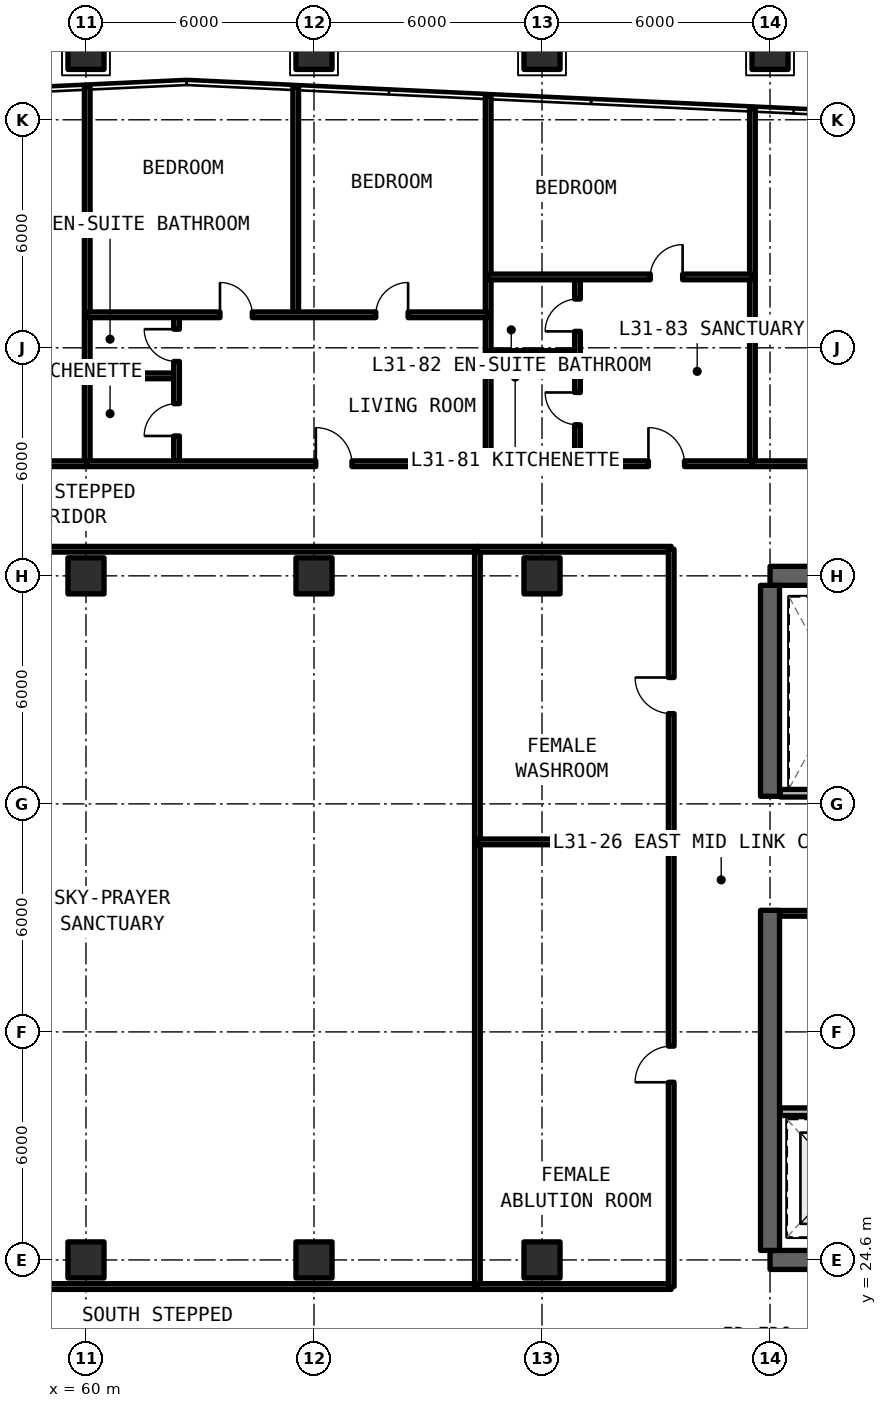
"""IFC4 building model, lengths in metres.
Left out: names, types, materials, properties, quantities, classifications, styles, units other than length and angle.
Written with IfcOpenShell. Run it as: python <this file> out.ifc"""

import sys

from ifc_helpers import new_model, si_unit, direction, frame, frame_2d, origin, origin_2d, place, context, subcontext, project, spatial, rectangle, extrude, element, fill, save


model = new_model("IFC4")
c1 = context("Model", 3, precision=1e-05, world=origin(), true_north=direction((0.0, 1.0)))
c2 = subcontext(c1, "Body", "Model", "MODEL_VIEW")
j1 = project(units=[si_unit("LENGTHUNIT", "METRE"), si_unit("PLANEANGLEUNIT", "RADIAN")], contexts=[c1])
p1 = place(None, origin())
s1 = spatial("IfcSite", under=j1, at=p1, CompositionType="ELEMENT")
p2 = place(p1, origin())
s2 = spatial("IfcBuilding", under=s1, at=p2, CompositionType="ELEMENT")
p3 = place(p2, frame((0.0, 0.0, 112.2)))
s3 = spatial("IfcBuildingStorey", under=s2, at=p3, CompositionType="ELEMENT", Elevation=112.2)
for number, where, z_axis, x_axis in (
    (1, (78.0, 24.6, 0.0), (0.0, 0.0, 1.0), (1.0, 0.0, 0.0)),
    (2, (90.0, 42.6, 0.0), (0.0, 0.0, 1.0), (-1.0, 0.0, 0.0)),
):
    element("IfcWall", number, at=place(p3, frame(where, z_axis=z_axis, x_axis=x_axis)), inside=s3, PredefinedType="SHEAR", context=c2, shape_type="SweptSolid", body=[
        extrude(rectangle(XDim=12.0, YDim=0.5, at=frame_2d((6.0, 0.0))), origin(), (0.0, 0.0, 1.0), 3.63),
    ])
p4 = place(p3, frame((78.0, 24.85, 0.0), z_axis=(0.0, 0.0, 1.0), x_axis=(0.0, 1.0, 0.0)))
e3 = element("IfcWall", 3, at=p4, inside=s3, PredefinedType="SHEAR", context=c2, shape_type="SweptSolid", body=[
    extrude(rectangle(XDim=8.95, YDim=0.5, at=frame_2d((4.475, 0.0))), origin(), (0.0, 0.0, 1.0), 3.63),
])
p5 = place(p3, frame((78.0, 36.8, 0.0), z_axis=(0.0, 0.0, 1.0), x_axis=(0.0, 1.0, 0.0)))
e4 = element("IfcWall", 4, at=p5, inside=s3, PredefinedType="SHEAR", context=c2, shape_type="SweptSolid", body=[
    extrude(rectangle(XDim=5.55, YDim=0.5, at=frame_2d((2.775, 0.0))), origin(), (0.0, 0.0, 1.0), 3.63),
])
for number, where, z_axis, x_axis in (
    (5, (60.0, 24.6, 0.0), (0.0, 0.0, 1.0), (1.0, 0.0, 0.0)),
    (6, (60.0, 42.6, 0.0), (0.0, 0.0, 1.0), (1.0, 0.0, 0.0)),
    (7, (66.0, 24.6, 0.0), (0.0, 0.0, 1.0), (1.0, 0.0, 0.0)),
    (8, (66.0, 42.6, 0.0), (0.0, 0.0, 1.0), (1.0, 0.0, 0.0)),
    (9, (72.0, 24.6, 0.0), (0.0, 0.0, 1.0), (1.0, 0.0, 0.0)),
    (10, (72.0, 42.6, 0.0), (0.0, 0.0, 1.0), (1.0, 0.0, 0.0)),
    (11, (60.0, 56.4, 0.0), (0.0, 0.0, 1.0), (1.0, 0.0, 0.0)),
    (12, (66.0, 56.4, 0.0), (0.0, 0.0, 1.0), (1.0, 0.0, 0.0)),
    (13, (72.0, 56.4, 0.0), (0.0, 0.0, 1.0), (1.0, 0.0, 0.0)),
    (14, (78.0, 56.4, 0.0), (0.0, 0.0, 1.0), (1.0, 0.0, 0.0)),
):
    element("IfcColumn", number, at=place(p3, frame(where, z_axis=z_axis, x_axis=x_axis)), inside=s3, PredefinedType="COLUMN", context=c2, shape_type="SweptSolid", body=[
        extrude(rectangle(XDim=0.95, YDim=0.95, at=origin_2d()), origin(), (0.0, 0.0, 1.0), 3.63),
    ])
p6 = place(p3, frame((78.27, 28.5, 0.0), z_axis=(0.0, 0.0, 1.0), x_axis=(1.0, 0.0, 0.0)))
e15 = element("IfcWall", 15, at=p6, inside=s3, PredefinedType="SOLIDWALL", context=c2, shape_type="SweptSolid", body=[
    extrude(rectangle(XDim=7.51, YDim=0.2, at=frame_2d((3.755, 0.0))), origin(), (0.0, 0.0, 1.0), 2.63),
])
p7 = place(p6, frame((3.53, 0.0, 0.0)))
e16 = element("IfcOpeningElement", 16, at=p7, cuts=e15, PredefinedType="OPENING", context=c2, shape_type="SweptSolid", body=[
    extrude(rectangle(XDim=1.0, YDim=2.15, at=frame_2d((0.5, 1.075))), frame((0.0, 0.11, 0.0), z_axis=(0.0, -1.0, 0.0), x_axis=(1.0, 0.0, 0.0)), (0.0, 0.0, 1.0), 0.22),
])
p8 = place(p3, frame((78.27, 33.72, 0.0), z_axis=(0.0, 0.0, 1.0), x_axis=(1.0, 0.0, 0.0)))
e17 = element("IfcWall", 17, at=p8, inside=s3, PredefinedType="SOLIDWALL", context=c2, shape_type="SweptSolid", body=[
    extrude(rectangle(XDim=3.05, YDim=0.15, at=frame_2d((1.525, 0.0))), origin(), (0.0, 0.0, 1.0), 2.63),
])
p9 = place(p3, frame((78.27, 36.88, 0.0), z_axis=(0.0, 0.0, 1.0), x_axis=(1.0, 0.0, 0.0)))
e18 = element("IfcWall", 18, at=p9, inside=s3, PredefinedType="SOLIDWALL", context=c2, shape_type="SweptSolid", body=[
    extrude(rectangle(XDim=3.05, YDim=0.2, at=frame_2d((1.525, 0.0))), origin(), (0.0, 0.0, 1.0), 2.63),
])
p10 = place(p3, frame((42.9, 23.9, 0.0), z_axis=(0.0, 0.0, 1.0), x_axis=(1.0, 0.0, 0.0)))
e19 = element("IfcWall", 19, at=p10, inside=s3, PredefinedType="SOLIDWALL", context=c2, shape_type="SweptSolid", body=[
    extrude(rectangle(XDim=27.4, YDim=0.15, at=frame_2d((13.7, 0.0))), origin(), (0.0, 0.0, 1.0), 2.63),
])
p11 = place(p10, frame((13.0, 0.0, 0.0)))
e20 = element("IfcOpeningElement", 20, at=p11, cuts=e19, PredefinedType="OPENING", context=c2, shape_type="SweptSolid", body=[
    extrude(rectangle(XDim=1.4, YDim=2.15, at=frame_2d((0.7, 1.075))), frame((0.0, 0.085, 0.0), z_axis=(0.0, -1.0, 0.0), x_axis=(1.0, 0.0, 0.0)), (0.0, 0.0, 1.0), 0.17),
])
p12 = place(p3, frame((42.9, 43.3, 0.0), z_axis=(0.0, 0.0, 1.0), x_axis=(1.0, 0.0, 0.0)))
e21 = element("IfcWall", 21, at=p12, inside=s3, PredefinedType="SOLIDWALL", context=c2, shape_type="SweptSolid", body=[
    extrude(rectangle(XDim=27.4, YDim=0.15, at=frame_2d((13.7, 0.0))), origin(), (0.0, 0.0, 1.0), 2.63),
])
p13 = place(p3, frame((70.3, 23.9, 0.0), z_axis=(0.0, 0.0, 1.0), x_axis=(0.0, 1.0, 0.0)))
e22 = element("IfcWall", 22, at=p13, inside=s3, PredefinedType="SOLIDWALL", context=c2, shape_type="SweptSolid", body=[
    extrude(rectangle(XDim=19.4, YDim=0.15, at=frame_2d((9.7, 0.0))), origin(), (0.0, 0.0, 1.0), 2.63),
])
for number, where, z_axis, x_axis in (
    (23, (70.3, 23.9, 0.0), (0.0, 0.0, 1.0), (1.0, 0.0, 0.0)),
    (24, (70.3, 35.6, 0.0), (0.0, 0.0, 1.0), (1.0, 0.0, 0.0)),
):
    element("IfcWall", number, at=place(p3, frame(where, z_axis=z_axis, x_axis=x_axis)), inside=s3, PredefinedType="SOLIDWALL", context=c2, shape_type="SweptSolid", body=[
        extrude(rectangle(XDim=5.1, YDim=0.15, at=frame_2d((2.55, 0.0))), origin(), (0.0, 0.0, 1.0), 2.63),
    ])
p14 = place(p3, frame((75.4, 23.9, 0.0), z_axis=(0.0, 0.0, 1.0), x_axis=(0.0, 1.0, 0.0)))
e25 = element("IfcWall", 25, at=p14, inside=s3, PredefinedType="SOLIDWALL", context=c2, shape_type="SweptSolid", body=[
    extrude(rectangle(XDim=11.7, YDim=0.15, at=frame_2d((5.85, 0.0))), origin(), (0.0, 0.0, 1.0), 2.63),
])
p15 = place(p14, frame((5.375, 0.0, 0.0)))
e26 = element("IfcOpeningElement", 26, at=p15, cuts=e25, PredefinedType="OPENING", context=c2, shape_type="SweptSolid", body=[
    extrude(rectangle(XDim=0.95, YDim=2.15, at=frame_2d((0.475, 1.075))), frame((0.0, 0.085, 0.0), z_axis=(0.0, -1.0, 0.0), x_axis=(1.0, 0.0, 0.0)), (0.0, 0.0, 1.0), 0.17),
])
p16 = place(p3, frame((70.3, 43.3, 0.0), z_axis=(0.0, 0.0, 1.0), x_axis=(1.0, 0.0, 0.0)))
e27 = element("IfcWall", 27, at=p16, inside=s3, PredefinedType="SOLIDWALL", context=c2, shape_type="SweptSolid", body=[
    extrude(rectangle(XDim=5.1, YDim=0.15, at=frame_2d((2.55, 0.0))), origin(), (0.0, 0.0, 1.0), 2.63),
])
p17 = place(p3, frame((75.4, 35.6, 0.0), z_axis=(0.0, 0.0, 1.0), x_axis=(0.0, 1.0, 0.0)))
e28 = element("IfcWall", 28, at=p17, inside=s3, PredefinedType="SOLIDWALL", context=c2, shape_type="SweptSolid", body=[
    extrude(rectangle(XDim=7.7, YDim=0.15, at=frame_2d((3.85, 0.0))), origin(), (0.0, 0.0, 1.0), 2.63),
])
p18 = place(p17, frame((3.375, 0.0, 0.0)))
e29 = element("IfcOpeningElement", 29, at=p18, cuts=e28, PredefinedType="OPENING", context=c2, shape_type="SweptSolid", body=[
    extrude(rectangle(XDim=0.95, YDim=2.15, at=frame_2d((0.475, 1.075))), frame((0.0, 0.085, 0.0), z_axis=(0.0, -1.0, 0.0), x_axis=(1.0, 0.0, 0.0)), (0.0, 0.0, 1.0), 0.17),
])
p19 = place(p3, frame((60.033, 45.55, 0.0), z_axis=(0.0, 0.0, 1.0), x_axis=(0.0, 1.0, 0.0)))
e30 = element("IfcWall", 30, at=p19, inside=s3, PredefinedType="SOLIDWALL", context=c2, shape_type="SweptSolid", body=[
    extrude(rectangle(XDim=9.922, YDim=0.15, at=frame_2d((4.961, 0.0))), origin(), (0.0, 0.0, 1.0), 2.63),
])
p20 = place(p3, frame((52.12, 45.55, 0.0), z_axis=(0.0, 0.0, 1.0), x_axis=(1.0, 0.0, 0.0)))
e31 = element("IfcWall", 31, at=p20, inside=s3, PredefinedType="SOLIDWALL", context=c2, shape_type="SweptSolid", body=[
    extrude(rectangle(XDim=7.913, YDim=0.15, at=frame_2d((3.956, 0.0))), origin(), (0.0, 0.0, 1.0), 2.63),
])
p21 = place(p20, frame((3.406, 0.0, 0.0)))
e32 = element("IfcOpeningElement", 32, at=p21, cuts=e31, PredefinedType="OPENING", context=c2, shape_type="SweptSolid", body=[
    extrude(rectangle(XDim=1.1, YDim=2.15, at=frame_2d((0.55, 1.075))), frame((0.0, 0.085, 0.0), z_axis=(0.0, -1.0, 0.0), x_axis=(1.0, 0.0, 0.0)), (0.0, 0.0, 1.0), 0.17),
])
p22 = place(p3, frame((70.583, 45.55, 0.0), z_axis=(0.0, 0.0, 1.0), x_axis=(0.0, 1.0, 0.0)))
e33 = element("IfcWall", 33, at=p22, inside=s3, PredefinedType="SOLIDWALL", context=c2, shape_type="SweptSolid", body=[
    extrude(rectangle(XDim=9.672, YDim=0.15, at=frame_2d((4.836, 0.0))), origin(), (0.0, 0.0, 1.0), 2.63),
])
p23 = place(p3, frame((60.033, 47.862, 0.0), z_axis=(0.0, 0.0, 1.0), x_axis=(1.0, 0.0, 0.0)))
e34 = element("IfcWall", 34, at=p23, inside=s3, PredefinedType="PARTITIONING", context=c2, shape_type="SweptSolid", body=[
    extrude(rectangle(XDim=2.35, YDim=0.15, at=frame_2d((1.175, 0.0))), origin(), (0.0, 0.0, 1.0), 2.63),
])
p24 = place(p3, frame((62.383, 45.55, 0.0), z_axis=(0.0, 0.0, 1.0), x_axis=(0.0, 1.0, 0.0)))
e35 = element("IfcWall", 35, at=p24, inside=s3, PredefinedType="PARTITIONING", context=c2, shape_type="SweptSolid", body=[
    extrude(rectangle(XDim=3.918, YDim=0.15, at=frame_2d((1.959, 0.0))), origin(), (0.0, 0.0, 1.0), 2.63),
])
p25 = place(p24, frame((0.731, 0.0, 0.0)))
e36 = element("IfcOpeningElement", 36, at=p25, cuts=e35, PredefinedType="OPENING", context=c2, shape_type="SweptSolid", body=[
    extrude(rectangle(XDim=0.85, YDim=2.1, at=frame_2d((0.425, 1.05))), frame((0.0, 0.085, 0.0), z_axis=(0.0, -1.0, 0.0), x_axis=(1.0, 0.0, 0.0)), (0.0, 0.0, 1.0), 0.17),
])
p26 = place(p24, frame((2.69, 0.0, 0.0)))
e37 = element("IfcOpeningElement", 37, at=p26, cuts=e35, PredefinedType="OPENING", context=c2, shape_type="SweptSolid", body=[
    extrude(rectangle(XDim=0.85, YDim=2.1, at=frame_2d((0.425, 1.05))), frame((0.0, 0.085, 0.0), z_axis=(0.0, -1.0, 0.0), x_axis=(1.0, 0.0, 0.0)), (0.0, 0.0, 1.0), 0.17),
])
p27 = place(p3, frame((65.519, 49.469, 0.0), z_axis=(0.0, 0.0, 1.0), x_axis=(0.0, 1.0, 0.0)))
e38 = element("IfcWall", 38, at=p27, inside=s3, PredefinedType="PARTITIONING", context=c2, shape_type="SweptSolid", body=[
    extrude(rectangle(XDim=5.992, YDim=0.15, at=frame_2d((2.996, 0.0))), origin(), (0.0, 0.0, 1.0), 2.63),
])
p28 = place(p3, frame((60.033, 49.469, 0.0), z_axis=(0.0, 0.0, 1.0), x_axis=(1.0, 0.0, 0.0)))
e39 = element("IfcWall", 39, at=p28, inside=s3, PredefinedType="PARTITIONING", context=c2, shape_type="SweptSolid", body=[
    extrude(rectangle(XDim=10.551, YDim=0.15, at=frame_2d((5.275, 0.0))), origin(), (0.0, 0.0, 1.0), 2.63),
])
p29 = place(p28, frame((3.493, 0.0, 0.0)))
e40 = element("IfcOpeningElement", 40, at=p29, cuts=e39, PredefinedType="OPENING", context=c2, shape_type="SweptSolid", body=[
    extrude(rectangle(XDim=0.85, YDim=2.1, at=frame_2d((0.425, 1.05))), frame((0.0, 0.085, 0.0), z_axis=(0.0, -1.0, 0.0), x_axis=(1.0, 0.0, 0.0)), (0.0, 0.0, 1.0), 0.17),
])
p30 = place(p28, frame((7.593, 0.0, 0.0)))
e41 = element("IfcOpeningElement", 41, at=p30, cuts=e39, PredefinedType="OPENING", context=c2, shape_type="SweptSolid", body=[
    extrude(rectangle(XDim=0.85, YDim=2.1, at=frame_2d((0.425, 1.05))), frame((0.0, 0.085, 0.0), z_axis=(0.0, -1.0, 0.0), x_axis=(1.0, 0.0, 0.0)), (0.0, 0.0, 1.0), 0.17),
])
p31 = place(p3, frame((60.033, 45.55, 0.0), z_axis=(0.0, 0.0, 1.0), x_axis=(1.0, 0.0, 0.0)))
e42 = element("IfcWall", 42, at=p31, inside=s3, PredefinedType="SOLIDWALL", context=c2, shape_type="SweptSolid", body=[
    extrude(rectangle(XDim=10.551, YDim=0.15, at=frame_2d((5.275, 0.0))), origin(), (0.0, 0.0, 1.0), 2.63),
])
p32 = place(p31, frame((6.015, 0.0, 0.0)))
e43 = element("IfcOpeningElement", 43, at=p32, cuts=e42, PredefinedType="OPENING", context=c2, shape_type="SweptSolid", body=[
    extrude(rectangle(XDim=0.95, YDim=2.15, at=frame_2d((0.475, 1.075))), frame((0.0, 0.085, 0.0), z_axis=(0.0, -1.0, 0.0), x_axis=(1.0, 0.0, 0.0)), (0.0, 0.0, 1.0), 0.17),
])
p33 = place(p3, frame((77.537, 45.55, 0.0), z_axis=(0.0, 0.0, 1.0), x_axis=(0.0, 1.0, 0.0)))
e44 = element("IfcWall", 44, at=p33, inside=s3, PredefinedType="SOLIDWALL", context=c2, shape_type="SweptSolid", body=[
    extrude(rectangle(XDim=9.346, YDim=0.15, at=frame_2d((4.673, 0.0))), origin(), (0.0, 0.0, 1.0), 2.63),
])
p34 = place(p3, frame((70.583, 48.45, 0.0), z_axis=(0.0, 0.0, 1.0), x_axis=(1.0, 0.0, 0.0)))
e45 = element("IfcWall", 45, at=p34, inside=s3, PredefinedType="PARTITIONING", context=c2, shape_type="SweptSolid", body=[
    extrude(rectangle(XDim=2.35, YDim=0.15, at=frame_2d((1.175, 0.0))), origin(), (0.0, 0.0, 1.0), 2.63),
])
p35 = place(p3, frame((72.933, 45.55, 0.0), z_axis=(0.0, 0.0, 1.0), x_axis=(0.0, 1.0, 0.0)))
e46 = element("IfcWall", 46, at=p35, inside=s3, PredefinedType="PARTITIONING", context=c2, shape_type="SweptSolid", body=[
    extrude(rectangle(XDim=4.915, YDim=0.15, at=frame_2d((2.458, 0.0))), origin(), (0.0, 0.0, 1.0), 2.63),
])
p36 = place(p35, frame((1.025, 0.0, 0.0)))
e47 = element("IfcOpeningElement", 47, at=p36, cuts=e46, PredefinedType="OPENING", context=c2, shape_type="SweptSolid", body=[
    extrude(rectangle(XDim=0.85, YDim=2.1, at=frame_2d((0.425, 1.05))), frame((0.0, 0.085, 0.0), z_axis=(0.0, -1.0, 0.0), x_axis=(1.0, 0.0, 0.0)), (0.0, 0.0, 1.0), 0.17),
])
p37 = place(p35, frame((3.482, 0.0, 0.0)))
e48 = element("IfcOpeningElement", 48, at=p37, cuts=e46, PredefinedType="OPENING", context=c2, shape_type="SweptSolid", body=[
    extrude(rectangle(XDim=0.85, YDim=2.1, at=frame_2d((0.425, 1.05))), frame((0.0, 0.085, 0.0), z_axis=(0.0, -1.0, 0.0), x_axis=(1.0, 0.0, 0.0)), (0.0, 0.0, 1.0), 0.17),
])
p38 = place(p3, frame((70.583, 50.465, 0.0), z_axis=(0.0, 0.0, 1.0), x_axis=(1.0, 0.0, 0.0)))
e49 = element("IfcWall", 49, at=p38, inside=s3, PredefinedType="PARTITIONING", context=c2, shape_type="SweptSolid", body=[
    extrude(rectangle(XDim=6.954, YDim=0.15, at=frame_2d((3.477, 0.0))), origin(), (0.0, 0.0, 1.0), 2.63),
])
p39 = place(p38, frame((4.267, 0.0, 0.0)))
e50 = element("IfcOpeningElement", 50, at=p39, cuts=e49, PredefinedType="OPENING", context=c2, shape_type="SweptSolid", body=[
    extrude(rectangle(XDim=0.85, YDim=2.1, at=frame_2d((0.425, 1.05))), frame((0.0, 0.085, 0.0), z_axis=(0.0, -1.0, 0.0), x_axis=(1.0, 0.0, 0.0)), (0.0, 0.0, 1.0), 0.17),
])
p40 = place(p3, frame((70.583, 45.55, 0.0), z_axis=(0.0, 0.0, 1.0), x_axis=(1.0, 0.0, 0.0)))
e51 = element("IfcWall", 51, at=p40, inside=s3, PredefinedType="SOLIDWALL", context=c2, shape_type="SweptSolid", body=[
    extrude(rectangle(XDim=6.954, YDim=0.15, at=frame_2d((3.477, 0.0))), origin(), (0.0, 0.0, 1.0), 2.63),
])
p41 = place(p40, frame((4.217, 0.0, 0.0)))
e52 = element("IfcOpeningElement", 52, at=p41, cuts=e51, PredefinedType="OPENING", context=c2, shape_type="SweptSolid", body=[
    extrude(rectangle(XDim=0.95, YDim=2.15, at=frame_2d((0.475, 1.075))), frame((0.0, 0.085, 0.0), z_axis=(0.0, -1.0, 0.0), x_axis=(1.0, 0.0, 0.0)), (0.0, 0.0, 1.0), 0.17),
])
p42 = place(p3, frame((77.537, 45.55, 0.0), z_axis=(0.0, 0.0, 1.0), x_axis=(1.0, 0.0, 0.0)))
e53 = element("IfcWall", 53, at=p42, inside=s3, PredefinedType="SOLIDWALL", context=c2, shape_type="SweptSolid", body=[
    extrude(rectangle(XDim=8.153, YDim=0.15, at=frame_2d((4.076, 0.0))), origin(), (0.0, 0.0, 1.0), 2.63),
])
p43 = place(p42, frame((3.526, 0.0, 0.0)))
e54 = element("IfcOpeningElement", 54, at=p43, cuts=e53, PredefinedType="OPENING", context=c2, shape_type="SweptSolid", body=[
    extrude(rectangle(XDim=1.1, YDim=2.15, at=frame_2d((0.55, 1.075))), frame((0.0, 0.085, 0.0), z_axis=(0.0, -1.0, 0.0), x_axis=(1.0, 0.0, 0.0)), (0.0, 0.0, 1.0), 0.17),
])
p44 = place(p15, origin())
e55 = element("IfcDoor", 55, at=p44, inside=s3, OperationType="SINGLE_SWING_LEFT", PredefinedType="DOOR", context=c2, shape_type="SweptSolid", body=[
    extrude(rectangle(XDim=0.95, YDim=2.15, at=frame_2d((0.475, 1.075))), frame((0.0, 0.025, 0.0), z_axis=(0.0, -1.0, 0.0), x_axis=(1.0, 0.0, 0.0)), (0.0, 0.0, 1.0), 0.05),
])
fill(e26, e55)
p45 = place(p18, origin())
e56 = element("IfcDoor", 56, at=p45, inside=s3, OperationType="SINGLE_SWING_RIGHT", PredefinedType="DOOR", context=c2, shape_type="SweptSolid", body=[
    extrude(rectangle(XDim=0.95, YDim=2.15, at=frame_2d((0.475, 1.075))), frame((0.0, 0.025, 0.0), z_axis=(0.0, -1.0, 0.0), x_axis=(1.0, 0.0, 0.0)), (0.0, 0.0, 1.0), 0.05),
])
fill(e29, e56)
p46 = place(p25, origin())
e57 = element("IfcDoor", 57, at=p46, inside=s3, OperationType="SINGLE_SWING_LEFT", PredefinedType="DOOR", context=c2, shape_type="SweptSolid", body=[
    extrude(rectangle(XDim=0.85, YDim=2.1, at=frame_2d((0.425, 1.05))), frame((0.0, 0.025, 0.0), z_axis=(0.0, -1.0, 0.0), x_axis=(1.0, 0.0, 0.0)), (0.0, 0.0, 1.0), 0.05),
])
fill(e36, e57)
p47 = place(p26, origin())
e58 = element("IfcDoor", 58, at=p47, inside=s3, OperationType="SINGLE_SWING_RIGHT", PredefinedType="DOOR", context=c2, shape_type="SweptSolid", body=[
    extrude(rectangle(XDim=0.85, YDim=2.1, at=frame_2d((0.425, 1.05))), frame((0.0, 0.025, 0.0), z_axis=(0.0, -1.0, 0.0), x_axis=(1.0, 0.0, 0.0)), (0.0, 0.0, 1.0), 0.05),
])
fill(e37, e58)
p48 = place(p29, origin())
e59 = element("IfcDoor", 59, at=p48, inside=s3, OperationType="SINGLE_SWING_LEFT", PredefinedType="DOOR", context=c2, shape_type="SweptSolid", body=[
    extrude(rectangle(XDim=0.85, YDim=2.1, at=frame_2d((0.425, 1.05))), frame((0.0, 0.025, 0.0), z_axis=(0.0, -1.0, 0.0), x_axis=(1.0, 0.0, 0.0)), (0.0, 0.0, 1.0), 0.05),
])
fill(e40, e59)
p49 = place(p30, origin())
e60 = element("IfcDoor", 60, at=p49, inside=s3, OperationType="SINGLE_SWING_RIGHT", PredefinedType="DOOR", context=c2, shape_type="SweptSolid", body=[
    extrude(rectangle(XDim=0.85, YDim=2.1, at=frame_2d((0.425, 1.05))), frame((0.0, 0.025, 0.0), z_axis=(0.0, -1.0, 0.0), x_axis=(1.0, 0.0, 0.0)), (0.0, 0.0, 1.0), 0.05),
])
fill(e41, e60)
p50 = place(p32, origin())
e61 = element("IfcDoor", 61, at=p50, inside=s3, OperationType="SINGLE_SWING_LEFT", PredefinedType="DOOR", context=c2, shape_type="SweptSolid", body=[
    extrude(rectangle(XDim=0.95, YDim=2.15, at=frame_2d((0.475, 1.075))), frame((0.0, 0.025, 0.0), z_axis=(0.0, -1.0, 0.0), x_axis=(1.0, 0.0, 0.0)), (0.0, 0.0, 1.0), 0.05),
])
fill(e43, e61)
p51 = place(p36, origin())
e62 = element("IfcDoor", 62, at=p51, inside=s3, OperationType="SINGLE_SWING_RIGHT", PredefinedType="DOOR", context=c2, shape_type="SweptSolid", body=[
    extrude(rectangle(XDim=0.85, YDim=2.1, at=frame_2d((0.425, 1.05))), frame((0.0, 0.025, 0.0), z_axis=(0.0, -1.0, 0.0), x_axis=(1.0, 0.0, 0.0)), (0.0, 0.0, 1.0), 0.05),
])
fill(e47, e62)
p52 = place(p37, origin())
e63 = element("IfcDoor", 63, at=p52, inside=s3, OperationType="SINGLE_SWING_LEFT", PredefinedType="DOOR", context=c2, shape_type="SweptSolid", body=[
    extrude(rectangle(XDim=0.85, YDim=2.1, at=frame_2d((0.425, 1.05))), frame((0.0, 0.025, 0.0), z_axis=(0.0, -1.0, 0.0), x_axis=(1.0, 0.0, 0.0)), (0.0, 0.0, 1.0), 0.05),
])
fill(e48, e63)
p53 = place(p39, origin())
e64 = element("IfcDoor", 64, at=p53, inside=s3, OperationType="SINGLE_SWING_RIGHT", PredefinedType="DOOR", context=c2, shape_type="SweptSolid", body=[
    extrude(rectangle(XDim=0.85, YDim=2.1, at=frame_2d((0.425, 1.05))), frame((0.0, 0.025, 0.0), z_axis=(0.0, -1.0, 0.0), x_axis=(1.0, 0.0, 0.0)), (0.0, 0.0, 1.0), 0.05),
])
fill(e50, e64)
p54 = place(p41, origin())
e65 = element("IfcDoor", 65, at=p54, inside=s3, OperationType="SINGLE_SWING_LEFT", PredefinedType="DOOR", context=c2, shape_type="SweptSolid", body=[
    extrude(rectangle(XDim=0.95, YDim=2.15, at=frame_2d((0.475, 1.075))), frame((0.0, 0.025, 0.0), z_axis=(0.0, -1.0, 0.0), x_axis=(1.0, 0.0, 0.0)), (0.0, 0.0, 1.0), 0.05),
])
fill(e52, e65)
save(model, sys.argv[1])
